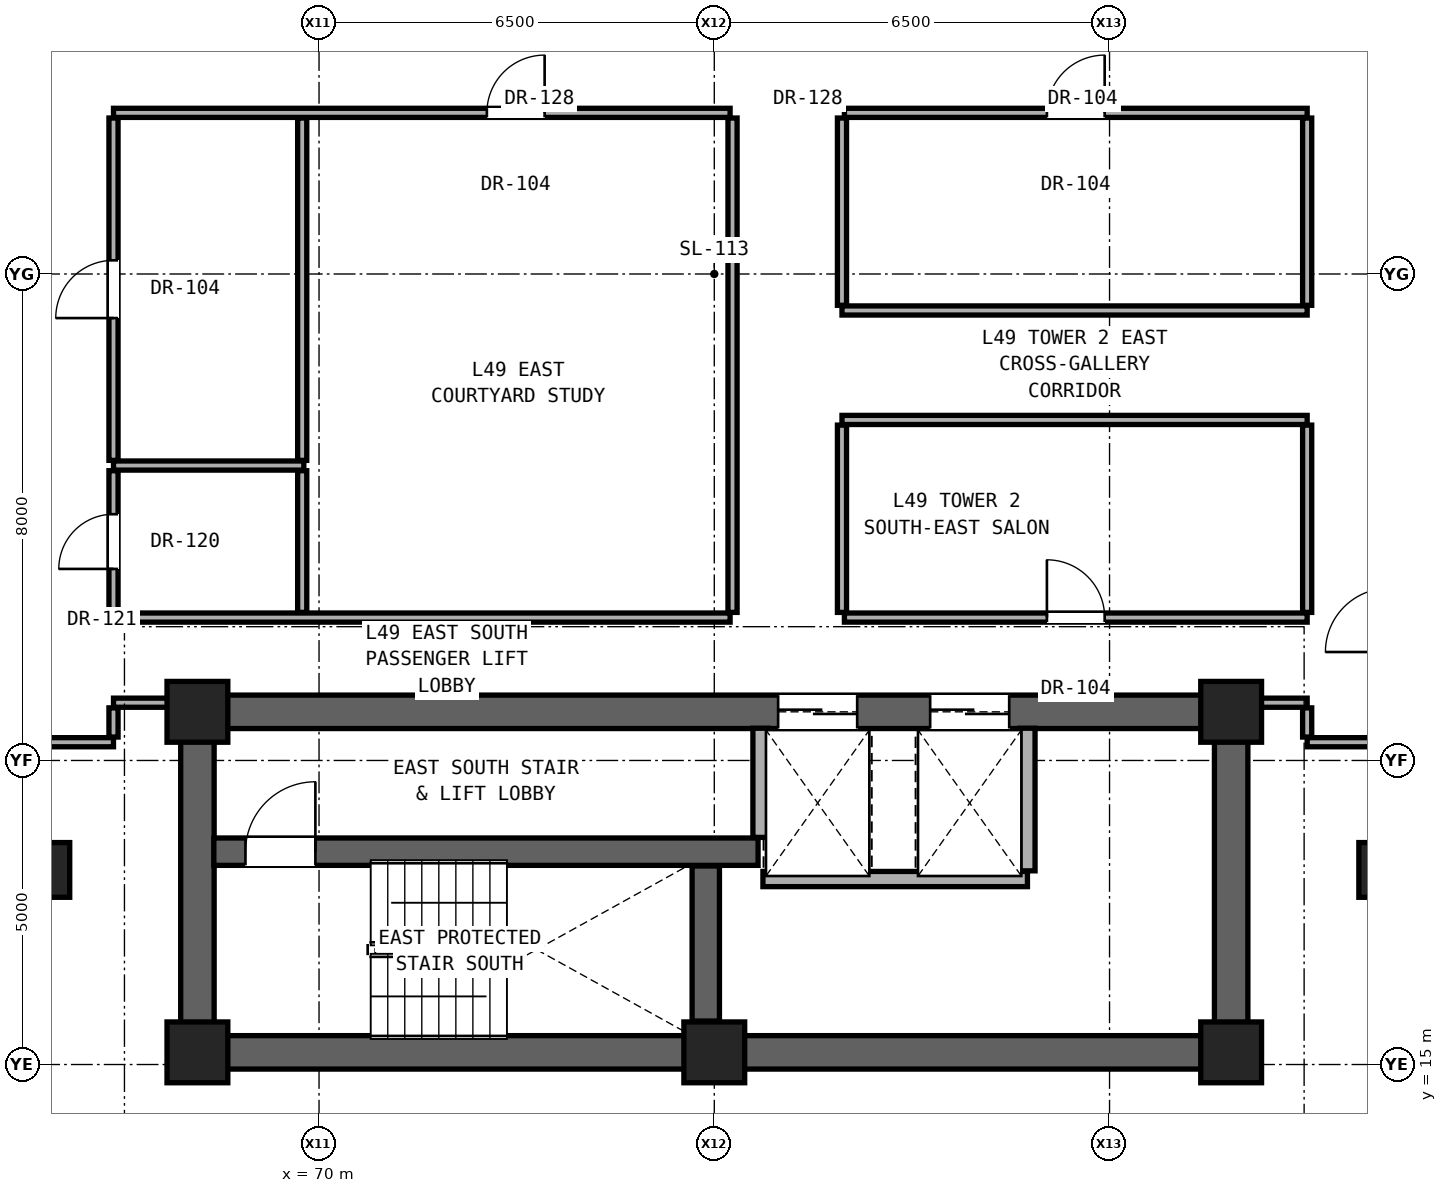
"""IFC4 building model, lengths in metres.
Left out: names, types, materials, properties, quantities, classifications, styles, units other than length and angle.
Written with IfcOpenShell. Run it as: python <this file> out.ifc"""

import sys

from ifc_helpers import new_model, si_unit, direction, frame, frame_2d, origin, origin_2d, place, context, subcontext, project, spatial, rectangle, extrude, element, fill, save


model = new_model("IFC4")
c1 = context("Model", 3, precision=1e-05, world=origin(), true_north=direction((0.0, 1.0)))
c2 = subcontext(c1, "Body", "Model", "MODEL_VIEW")
j1 = project(units=[si_unit("LENGTHUNIT", "METRE"), si_unit("PLANEANGLEUNIT", "RADIAN")], contexts=[c1])
p1 = place(None, origin())
s1 = spatial("IfcSite", under=j1, at=p1, CompositionType="ELEMENT")
p2 = place(p1, origin())
s2 = spatial("IfcBuilding", under=s1, at=p2, CompositionType="ELEMENT")
p3 = place(p2, frame((0.0, 0.0, 173.9)))
s3 = spatial("IfcBuildingStorey", under=s2, at=p3, CompositionType="ELEMENT", Elevation=173.9)
for number, where, z_axis, x_axis in (
    (1, (68.0, 15.2, 0.0), (0.0, 0.0, 1.0), (1.0, 0.0, 0.0)),
    (2, (76.5, 15.2, 0.0), (0.0, 0.0, 1.0), (1.0, 0.0, 0.0)),
    (3, (85.0, 15.2, 0.0), (0.0, 0.0, 1.0), (1.0, 0.0, 0.0)),
    (4, (68.0, 20.8, 0.0), (0.0, 0.0, 1.0), (1.0, 0.0, 0.0)),
    (5, (85.0, 20.8, 0.0), (0.0, 0.0, 1.0), (1.0, 0.0, 0.0)),
):
    element("IfcColumn", number, at=place(p3, frame(where, z_axis=z_axis, x_axis=x_axis)), inside=s3, PredefinedType="COLUMN", context=c2, shape_type="SweptSolid", body=[
        extrude(rectangle(XDim=1.0, YDim=1.0, at=origin_2d()), origin(), (0.0, 0.0, 1.0), 3.25),
    ])
for number, where, z_axis, x_axis in (
    (6, (65.6, 18.2, 0.0), (0.0, 0.0, 1.0), (1.0, 0.0, 0.0)),
    (7, (87.4, 18.2, 0.0), (0.0, 0.0, 1.0), (1.0, 0.0, 0.0)),
):
    element("IfcColumn", number, at=place(p3, frame(where, z_axis=z_axis, x_axis=x_axis)), inside=s3, PredefinedType="PILASTER", context=c2, shape_type="SweptSolid", body=[
        extrude(rectangle(XDim=0.6, YDim=0.9, at=origin_2d()), origin(), (0.0, 0.0, 1.0), 3.25),
    ])
p4 = place(p3, frame((68.0, 15.2, 0.0), z_axis=(0.0, 0.0, 1.0), x_axis=(1.0, 0.0, 0.0)))
e8 = element("IfcWall", 8, at=p4, inside=s3, PredefinedType="SHEAR", context=c2, shape_type="SweptSolid", body=[
    extrude(rectangle(XDim=17.0, YDim=0.55, at=frame_2d((8.5, 0.0))), origin(), (0.0, 0.0, 1.0), 3.05),
])
for number, where, z_axis, x_axis in (
    (9, (68.0, 15.2, 0.0), (0.0, 0.0, 1.0), (0.0, 1.0, 0.0)),
    (10, (85.0, 15.2, 0.0), (0.0, 0.0, 1.0), (0.0, 1.0, 0.0)),
):
    element("IfcWall", number, at=place(p3, frame(where, z_axis=z_axis, x_axis=x_axis)), inside=s3, PredefinedType="SHEAR", context=c2, shape_type="SweptSolid", body=[
        extrude(rectangle(XDim=5.6, YDim=0.55, at=frame_2d((2.8, 0.0))), origin(), (0.0, 0.0, 1.0), 3.05),
    ])
p5 = place(p3, frame((68.0, 20.8, 0.0), z_axis=(0.0, 0.0, 1.0), x_axis=(1.0, 0.0, 0.0)))
e11 = element("IfcWall", 11, at=p5, inside=s3, PredefinedType="SHEAR", context=c2, shape_type="SweptSolid", body=[
    extrude(rectangle(XDim=17.0, YDim=0.55, at=frame_2d((8.5, 0.0))), origin(), (0.0, 0.0, 1.0), 3.05),
])
p6 = place(p5, frame((9.55, 0.0, 0.0)))
e12 = element("IfcOpeningElement", 12, at=p6, cuts=e11, PredefinedType="OPENING", context=c2, shape_type="SweptSolid", body=[
    extrude(rectangle(XDim=1.3, YDim=2.3, at=frame_2d((0.65, 1.15))), frame((0.0, 0.285, 0.0), z_axis=(0.0, -1.0, 0.0), x_axis=(1.0, 0.0, 0.0)), (0.0, 0.0, 1.0), 0.57),
])
p7 = place(p5, frame((12.05, 0.0, 0.0)))
e13 = element("IfcOpeningElement", 13, at=p7, cuts=e11, PredefinedType="OPENING", context=c2, shape_type="SweptSolid", body=[
    extrude(rectangle(XDim=1.3, YDim=2.3, at=frame_2d((0.65, 1.15))), frame((0.0, 0.285, 0.0), z_axis=(0.0, -1.0, 0.0), x_axis=(1.0, 0.0, 0.0)), (0.0, 0.0, 1.0), 0.57),
])
p8 = place(p3, frame((77.3, 18.05, 0.0), z_axis=(0.0, 0.0, 1.0), x_axis=(1.0, 0.0, 0.0)))
e14 = element("IfcWall", 14, at=p8, inside=s3, PredefinedType="SOLIDWALL", context=c2, shape_type="SweptSolid", body=[
    extrude(rectangle(XDim=4.35, YDim=0.25, at=frame_2d((2.175, 0.0))), origin(), (0.0, 0.0, 1.0), 3.05),
])
p9 = place(p3, frame((68.27, 18.5, 0.0), z_axis=(0.0, 0.0, 1.0), x_axis=(1.0, 0.0, 0.0)))
e15 = element("IfcWall", 15, at=p9, inside=s3, PredefinedType="SHEAR", context=c2, shape_type="SweptSolid", body=[
    extrude(rectangle(XDim=8.95, YDim=0.45, at=frame_2d((4.475, 0.0))), origin(), (0.0, 0.0, 1.0), 3.05),
])
p10 = place(p9, frame((0.52, 0.0, 0.0)))
e16 = element("IfcOpeningElement", 16, at=p10, cuts=e15, PredefinedType="OPENING", context=c2, shape_type="SweptSolid", body=[
    extrude(rectangle(XDim=1.15, YDim=2.2, at=frame_2d((0.575, 1.1))), frame((0.0, 0.235, 0.0), z_axis=(0.0, -1.0, 0.0), x_axis=(1.0, 0.0, 0.0)), (0.0, 0.0, 1.0), 0.47),
])
p11 = place(p3, frame((65.25, 20.3, 0.0), z_axis=(0.0, 0.0, 1.0), x_axis=(1.0, 0.0, 0.0)))
e17 = element("IfcWall", 17, at=p11, inside=s3, PredefinedType="PARTITIONING", context=c2, shape_type="SweptSolid", body=[
    extrude(rectangle(XDim=1.37, YDim=0.15, at=frame_2d((0.685, 0.0))), origin(), (0.0, 0.0, 1.0), 3.05),
])
p12 = place(p3, frame((86.25, 20.3, 0.0), z_axis=(0.0, 0.0, 1.0), x_axis=(1.0, 0.0, 0.0)))
e18 = element("IfcWall", 18, at=p12, inside=s3, PredefinedType="PARTITIONING", context=c2, shape_type="SweptSolid", body=[
    extrude(rectangle(XDim=1.35, YDim=0.15, at=frame_2d((0.675, 0.0))), origin(), (0.0, 0.0, 1.0), 3.05),
])
p13 = place(p3, frame((66.62, 20.95, 0.0), z_axis=(0.0, 0.0, 1.0), x_axis=(1.0, 0.0, 0.0)))
e19 = element("IfcWall", 19, at=p13, inside=s3, PredefinedType="PARTITIONING", context=c2, shape_type="SweptSolid", body=[
    extrude(rectangle(XDim=1.11, YDim=0.15, at=frame_2d((0.555, 0.0))), origin(), (0.0, 0.0, 1.0), 2.442),
])
p14 = place(p3, frame((85.27, 20.95, 0.0), z_axis=(0.0, 0.0, 1.0), x_axis=(1.0, 0.0, 0.0)))
e20 = element("IfcWall", 20, at=p14, inside=s3, PredefinedType="PARTITIONING", context=c2, shape_type="SweptSolid", body=[
    extrude(rectangle(XDim=0.98, YDim=0.15, at=frame_2d((0.49, 0.0))), origin(), (0.0, 0.0, 1.0), 2.442),
])
p15 = place(p3, frame((66.62, 22.35, 0.0), z_axis=(0.0, 0.0, 1.0), x_axis=(1.0, 0.0, 0.0)))
e21 = element("IfcWall", 21, at=p15, inside=s3, PredefinedType="PARTITIONING", context=c2, shape_type="SweptSolid", body=[
    extrude(rectangle(XDim=10.14, YDim=0.15, at=frame_2d((5.07, 0.0))), origin(), (0.0, 0.0, 1.0), 2.186),
])
p16 = place(p3, frame((78.64, 22.35, 0.0), z_axis=(0.0, 0.0, 1.0), x_axis=(1.0, 0.0, 0.0)))
e22 = element("IfcWall", 22, at=p16, inside=s3, PredefinedType="PARTITIONING", context=c2, shape_type="SweptSolid", body=[
    extrude(rectangle(XDim=7.61, YDim=0.15, at=frame_2d((3.805, 0.0))), origin(), (0.0, 0.0, 1.0), 2.186),
])
p17 = place(p16, frame((3.33, 0.0, 0.0)))
e23 = element("IfcOpeningElement", 23, at=p17, cuts=e22, PredefinedType="OPENING", context=c2, shape_type="SweptSolid", body=[
    extrude(rectangle(XDim=0.95, YDim=2.15, at=frame_2d((0.475, 1.075))), frame((0.0, 0.085, 0.0), z_axis=(0.0, -1.0, 0.0), x_axis=(1.0, 0.0, 0.0)), (0.0, 0.0, 1.0), 0.17),
])
p18 = place(p3, frame((66.62, 24.85, 0.0), z_axis=(0.0, 0.0, 1.0), x_axis=(1.0, 0.0, 0.0)))
e24 = element("IfcWall", 24, at=p18, inside=s3, PredefinedType="PARTITIONING", context=c2, shape_type="SweptSolid", body=[
    extrude(rectangle(XDim=3.13, YDim=0.15, at=frame_2d((1.565, 0.0))), origin(), (0.0, 0.0, 1.0), 2.186),
])
for number, where, z_axis, x_axis in (
    (25, (78.6, 25.6, 0.0), (0.0, 0.0, 1.0), (1.0, 0.0, 0.0)),
    (26, (78.6, 27.4, 0.0), (0.0, 0.0, 1.0), (1.0, 0.0, 0.0)),
):
    element("IfcWall", number, at=place(p3, frame(where, z_axis=z_axis, x_axis=x_axis)), inside=s3, PredefinedType="PARTITIONING", context=c2, shape_type="SweptSolid", body=[
        extrude(rectangle(XDim=7.65, YDim=0.15, at=frame_2d((3.825, 0.0))), origin(), (0.0, 0.0, 1.0), 2.186),
    ])
p19 = place(p3, frame((66.62, 30.65, 0.0), z_axis=(0.0, 0.0, 1.0), x_axis=(1.0, 0.0, 0.0)))
e27 = element("IfcWall", 27, at=p19, inside=s3, PredefinedType="PARTITIONING", context=c2, shape_type="SweptSolid", body=[
    extrude(rectangle(XDim=10.14, YDim=0.15, at=frame_2d((5.07, 0.0))), origin(), (0.0, 0.0, 1.0), 2.186),
])
p20 = place(p19, frame((6.14, 0.0, 0.0)))
e28 = element("IfcOpeningElement", 28, at=p20, cuts=e27, PredefinedType="OPENING", context=c2, shape_type="SweptSolid", body=[
    extrude(rectangle(XDim=0.95, YDim=2.15, at=frame_2d((0.475, 1.075))), frame((0.0, 0.085, 0.0), z_axis=(0.0, -1.0, 0.0), x_axis=(1.0, 0.0, 0.0)), (0.0, 0.0, 1.0), 0.17),
])
p21 = place(p3, frame((78.64, 30.65, 0.0), z_axis=(0.0, 0.0, 1.0), x_axis=(1.0, 0.0, 0.0)))
e29 = element("IfcWall", 29, at=p21, inside=s3, PredefinedType="PARTITIONING", context=c2, shape_type="SweptSolid", body=[
    extrude(rectangle(XDim=7.61, YDim=0.15, at=frame_2d((3.805, 0.0))), origin(), (0.0, 0.0, 1.0), 2.186),
])
p22 = place(p21, frame((3.33, 0.0, 0.0)))
e30 = element("IfcOpeningElement", 30, at=p22, cuts=e29, PredefinedType="OPENING", context=c2, shape_type="SweptSolid", body=[
    extrude(rectangle(XDim=0.95, YDim=2.15, at=frame_2d((0.475, 1.075))), frame((0.0, 0.085, 0.0), z_axis=(0.0, -1.0, 0.0), x_axis=(1.0, 0.0, 0.0)), (0.0, 0.0, 1.0), 0.17),
])
p23 = place(p3, frame((66.62, 20.385, 0.0), z_axis=(0.0, 0.0, 1.0), x_axis=(0.0, 1.0, 0.0)))
e31 = element("IfcWall", 31, at=p23, inside=s3, PredefinedType="PARTITIONING", context=c2, shape_type="SweptSolid", body=[
    extrude(rectangle(XDim=0.48, YDim=0.15, at=frame_2d((0.24, 0.0))), origin(), (0.0, 0.0, 1.0), 2.442),
])
p24 = place(p3, frame((66.62, 22.435, 0.0), z_axis=(0.0, 0.0, 1.0), x_axis=(0.0, 1.0, 0.0)))
e32 = element("IfcWall", 32, at=p24, inside=s3, PredefinedType="PARTITIONING", context=c2, shape_type="SweptSolid", body=[
    extrude(rectangle(XDim=2.33, YDim=0.15, at=frame_2d((1.165, 0.0))), origin(), (0.0, 0.0, 1.0), 3.05),
])
p25 = place(p24, frame((0.715, 0.0, 0.0)))
e33 = element("IfcOpeningElement", 33, at=p25, cuts=e32, PredefinedType="OPENING", context=c2, shape_type="SweptSolid", body=[
    extrude(rectangle(XDim=0.9, YDim=2.1, at=frame_2d((0.45, 1.05))), frame((0.0, 0.085, 0.0), z_axis=(0.0, -1.0, 0.0), x_axis=(1.0, 0.0, 0.0)), (0.0, 0.0, 1.0), 0.17),
])
p26 = place(p3, frame((66.62, 24.935, 0.0), z_axis=(0.0, 0.0, 1.0), x_axis=(0.0, 1.0, 0.0)))
e34 = element("IfcWall", 34, at=p26, inside=s3, PredefinedType="PARTITIONING", context=c2, shape_type="SweptSolid", body=[
    extrude(rectangle(XDim=5.63, YDim=0.15, at=frame_2d((2.815, 0.0))), origin(), (0.0, 0.0, 1.0), 2.346),
])
p27 = place(p26, frame((2.34, 0.0, 0.0)))
e35 = element("IfcOpeningElement", 35, at=p27, cuts=e34, PredefinedType="OPENING", context=c2, shape_type="SweptSolid", body=[
    extrude(rectangle(XDim=0.95, YDim=2.15, at=frame_2d((0.475, 1.075))), frame((0.0, 0.085, 0.0), z_axis=(0.0, -1.0, 0.0), x_axis=(1.0, 0.0, 0.0)), (0.0, 0.0, 1.0), 0.17),
])
p28 = place(p3, frame((69.723, 22.435, 0.0), z_axis=(0.0, 0.0, 1.0), x_axis=(0.0, 1.0, 0.0)))
e36 = element("IfcWall", 36, at=p28, inside=s3, PredefinedType="PARTITIONING", context=c2, shape_type="SweptSolid", body=[
    extrude(rectangle(XDim=2.33, YDim=0.15, at=frame_2d((1.165, 0.0))), origin(), (0.0, 0.0, 1.0), 3.05),
])
p29 = place(p3, frame((69.723, 24.935, 0.0), z_axis=(0.0, 0.0, 1.0), x_axis=(0.0, 1.0, 0.0)))
e37 = element("IfcWall", 37, at=p29, inside=s3, PredefinedType="PARTITIONING", context=c2, shape_type="SweptSolid", body=[
    extrude(rectangle(XDim=5.63, YDim=0.15, at=frame_2d((2.815, 0.0))), origin(), (0.0, 0.0, 1.0), 2.186),
])
p30 = place(p3, frame((76.36, 15.715, 0.0), z_axis=(0.0, 0.0, 1.0), x_axis=(0.0, 1.0, 0.0)))
e38 = element("IfcWall", 38, at=p30, inside=s3, PredefinedType="SHEAR", context=c2, shape_type="SweptSolid", body=[
    extrude(rectangle(XDim=2.55, YDim=0.45, at=frame_2d((1.275, 0.0))), origin(), (0.0, 0.0, 1.0), 3.05),
])
p31 = place(p3, frame((76.8, 22.435, 0.0), z_axis=(0.0, 0.0, 1.0), x_axis=(0.0, 1.0, 0.0)))
e39 = element("IfcWall", 39, at=p31, inside=s3, PredefinedType="PARTITIONING", context=c2, shape_type="SweptSolid", body=[
    extrude(rectangle(XDim=8.13, YDim=0.15, at=frame_2d((4.065, 0.0))), origin(), (0.0, 0.0, 1.0), 2.186),
])
p32 = place(p3, frame((77.26, 18.735, 0.0), z_axis=(0.0, 0.0, 1.0), x_axis=(0.0, 1.0, 0.0)))
e40 = element("IfcWall", 40, at=p32, inside=s3, PredefinedType="SOLIDWALL", context=c2, shape_type="SweptSolid", body=[
    extrude(rectangle(XDim=1.795, YDim=0.25, at=frame_2d((0.897, 0.0))), origin(), (0.0, 0.0, 1.0), 3.05),
])
p33 = place(p3, frame((78.6, 22.435, 0.0), z_axis=(0.0, 0.0, 1.0), x_axis=(0.0, 1.0, 0.0)))
e41 = element("IfcWall", 41, at=p33, inside=s3, PredefinedType="PARTITIONING", context=c2, shape_type="SweptSolid", body=[
    extrude(rectangle(XDim=3.08, YDim=0.15, at=frame_2d((1.54, 0.0))), origin(), (0.0, 0.0, 1.0), 3.05),
])
p34 = place(p3, frame((78.6, 27.485, 0.0), z_axis=(0.0, 0.0, 1.0), x_axis=(0.0, 1.0, 0.0)))
e42 = element("IfcWall", 42, at=p34, inside=s3, PredefinedType="PARTITIONING", context=c2, shape_type="SweptSolid", body=[
    extrude(rectangle(XDim=3.08, YDim=0.15, at=frame_2d((1.54, 0.0))), origin(), (0.0, 0.0, 1.0), 2.186),
])
p35 = place(p3, frame((81.65, 18.185, 0.0), z_axis=(0.0, 0.0, 1.0), x_axis=(0.0, 1.0, 0.0)))
e43 = element("IfcWall", 43, at=p35, inside=s3, PredefinedType="SOLIDWALL", context=c2, shape_type="SweptSolid", body=[
    extrude(rectangle(XDim=2.345, YDim=0.25, at=frame_2d((1.172, 0.0))), origin(), (0.0, 0.0, 1.0), 3.05),
])
p36 = place(p3, frame((86.25, 20.385, 0.0), z_axis=(0.0, 0.0, 1.0), x_axis=(0.0, 1.0, 0.0)))
e44 = element("IfcWall", 44, at=p36, inside=s3, PredefinedType="PARTITIONING", context=c2, shape_type="SweptSolid", body=[
    extrude(rectangle(XDim=0.48, YDim=0.15, at=frame_2d((0.24, 0.0))), origin(), (0.0, 0.0, 1.0), 2.442),
])
p37 = place(p3, frame((86.25, 22.435, 0.0), z_axis=(0.0, 0.0, 1.0), x_axis=(0.0, 1.0, 0.0)))
e45 = element("IfcWall", 45, at=p37, inside=s3, PredefinedType="PARTITIONING", context=c2, shape_type="SweptSolid", body=[
    extrude(rectangle(XDim=3.08, YDim=0.15, at=frame_2d((1.54, 0.0))), origin(), (0.0, 0.0, 1.0), 3.05),
])
p38 = place(p3, frame((86.25, 27.485, 0.0), z_axis=(0.0, 0.0, 1.0), x_axis=(0.0, 1.0, 0.0)))
e46 = element("IfcWall", 46, at=p38, inside=s3, PredefinedType="PARTITIONING", context=c2, shape_type="SweptSolid", body=[
    extrude(rectangle(XDim=3.08, YDim=0.15, at=frame_2d((1.54, 0.0))), origin(), (0.0, 0.0, 1.0), 2.346),
])
p39 = place(p10, origin())
e47 = element("IfcDoor", 47, at=p39, inside=s3, OperationType="SINGLE_SWING_RIGHT", PredefinedType="DOOR", context=c2, shape_type="SweptSolid", body=[
    extrude(rectangle(XDim=1.15, YDim=2.2, at=frame_2d((0.575, 1.1))), frame((0.0, 0.025, 0.0), z_axis=(0.0, -1.0, 0.0), x_axis=(1.0, 0.0, 0.0)), (0.0, 0.0, 1.0), 0.05),
])
fill(e16, e47)
p40 = place(p25, origin())
e48 = element("IfcDoor", 48, at=p40, inside=s3, OperationType="SINGLE_SWING_LEFT", PredefinedType="DOOR", context=c2, shape_type="SweptSolid", body=[
    extrude(rectangle(XDim=0.9, YDim=2.1, at=frame_2d((0.45, 1.05))), frame((0.0, 0.025, 0.0), z_axis=(0.0, -1.0, 0.0), x_axis=(1.0, 0.0, 0.0)), (0.0, 0.0, 1.0), 0.05),
])
fill(e33, e48)
p41 = place(p27, origin())
e49 = element("IfcDoor", 49, at=p41, inside=s3, OperationType="SINGLE_SWING_LEFT", PredefinedType="DOOR", context=c2, shape_type="SweptSolid", body=[
    extrude(rectangle(XDim=0.95, YDim=2.15, at=frame_2d((0.475, 1.075))), frame((0.0, 0.025, 0.0), z_axis=(0.0, -1.0, 0.0), x_axis=(1.0, 0.0, 0.0)), (0.0, 0.0, 1.0), 0.05),
])
fill(e35, e49)
p42 = place(p20, origin())
e50 = element("IfcDoor", 50, at=p42, inside=s3, OperationType="SINGLE_SWING_RIGHT", PredefinedType="DOOR", context=c2, shape_type="SweptSolid", body=[
    extrude(rectangle(XDim=0.95, YDim=2.15, at=frame_2d((0.475, 1.075))), frame((0.0, 0.025, 0.0), z_axis=(0.0, -1.0, 0.0), x_axis=(1.0, 0.0, 0.0)), (0.0, 0.0, 1.0), 0.05),
])
fill(e28, e50)
p43 = place(p17, origin())
e51 = element("IfcDoor", 51, at=p43, inside=s3, OperationType="SINGLE_SWING_LEFT", PredefinedType="DOOR", context=c2, shape_type="SweptSolid", body=[
    extrude(rectangle(XDim=0.95, YDim=2.15, at=frame_2d((0.475, 1.075))), frame((0.0, 0.025, 0.0), z_axis=(0.0, -1.0, 0.0), x_axis=(1.0, 0.0, 0.0)), (0.0, 0.0, 1.0), 0.05),
])
fill(e23, e51)
p44 = place(p22, origin())
e52 = element("IfcDoor", 52, at=p44, inside=s3, OperationType="SINGLE_SWING_RIGHT", PredefinedType="DOOR", context=c2, shape_type="SweptSolid", body=[
    extrude(rectangle(XDim=0.95, YDim=2.15, at=frame_2d((0.475, 1.075))), frame((0.0, 0.025, 0.0), z_axis=(0.0, -1.0, 0.0), x_axis=(1.0, 0.0, 0.0)), (0.0, 0.0, 1.0), 0.05),
])
fill(e30, e52)
p45 = place(p6, origin())
e53 = element("IfcDoor", 53, at=p45, inside=s3, OperationType="DOUBLE_DOOR_SLIDING", PredefinedType="DOOR", context=c2, shape_type="SweptSolid", body=[
    extrude(rectangle(XDim=1.3, YDim=2.3, at=frame_2d((0.65, 1.15))), frame((0.0, 0.025, 0.0), z_axis=(0.0, -1.0, 0.0), x_axis=(1.0, 0.0, 0.0)), (0.0, 0.0, 1.0), 0.05),
])
fill(e12, e53)
p46 = place(p7, origin())
e54 = element("IfcDoor", 54, at=p46, inside=s3, OperationType="DOUBLE_DOOR_SLIDING", PredefinedType="DOOR", context=c2, shape_type="SweptSolid", body=[
    extrude(rectangle(XDim=1.3, YDim=2.3, at=frame_2d((0.65, 1.15))), frame((0.0, 0.025, 0.0), z_axis=(0.0, -1.0, 0.0), x_axis=(1.0, 0.0, 0.0)), (0.0, 0.0, 1.0), 0.05),
])
fill(e13, e54)
save(model, sys.argv[1])
